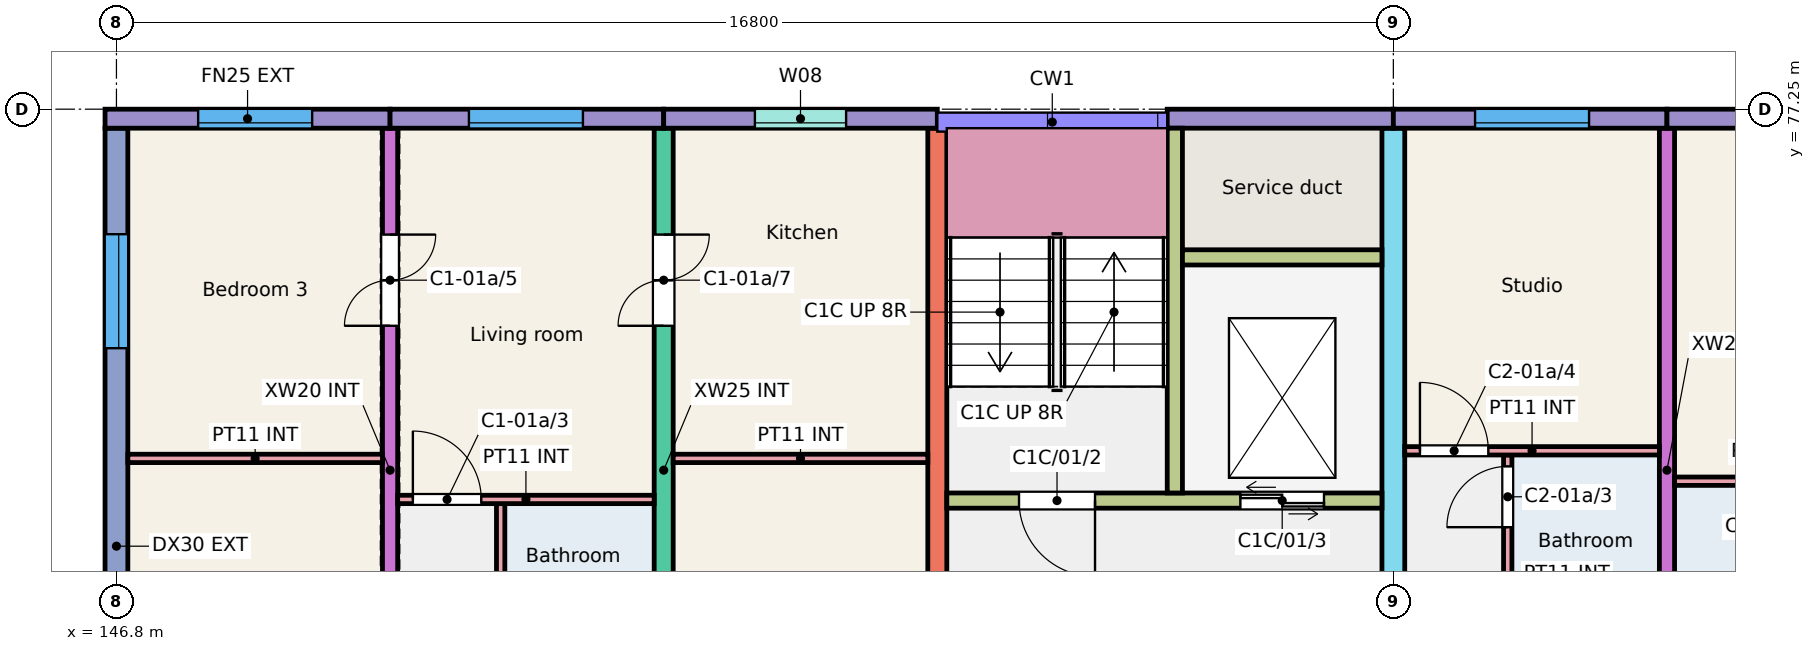
"""IFC4 building model, lengths in metres.
Left out: names, types, materials, properties, quantities, classifications, styles, units other than length and angle.
Written with IfcOpenShell. Run it as: python <this file> out.ifc"""

import sys

from ifc_helpers import new_model, si_unit, direction, frame, frame_2d, origin, place, context, subcontext, project, spatial, rectangle, extrude, element, fill, save


model = new_model("IFC4")
c1 = context("Model", 3, precision=1e-05, world=origin(), true_north=direction((0.0, 1.0)))
c2 = subcontext(c1, "Body", "Model", "MODEL_VIEW")
j1 = project(units=[si_unit("LENGTHUNIT", "METRE"), si_unit("PLANEANGLEUNIT", "RADIAN")], contexts=[c1])
p1 = place(None, origin())
s1 = spatial("IfcSite", under=j1, at=p1, CompositionType="ELEMENT")
p2 = place(p1, origin())
s2 = spatial("IfcBuilding", under=s1, at=p2, CompositionType="ELEMENT")
p3 = place(p2, frame((0.0, 0.0, 3.0)))
s3 = spatial("IfcBuildingStorey", under=s2, at=p3, CompositionType="ELEMENT", Elevation=3.0)
p4 = place(p3, frame((146.8, 66.0, 0.0), z_axis=(0.0, 0.0, 1.0), x_axis=(0.0, 1.0, 0.0)))
e1 = element("IfcWall", 1, at=p4, inside=s3, PredefinedType="SHEAR", context=c2, shape_type="SweptSolid", body=[
    extrude(rectangle(XDim=11.0, YDim=0.3, at=frame_2d((5.5, 0.0))), origin(), (0.0, 0.0, 1.0), 3.0),
])
p5 = place(p4, frame((3.55, 0.0, 0.9)))
e2 = element("IfcOpeningElement", 2, at=p5, cuts=e1, PredefinedType="OPENING", context=c2, shape_type="SweptSolid", body=[
    extrude(rectangle(XDim=1.5, YDim=1.5, at=frame_2d((0.75, 0.75))), frame((0.0, 0.16, 0.0), z_axis=(0.0, -1.0, 0.0), x_axis=(1.0, 0.0, 0.0)), (0.0, 0.0, 1.0), 0.32),
])
p6 = place(p4, frame((8.105, 0.0, 0.9)))
e3 = element("IfcOpeningElement", 3, at=p6, cuts=e1, PredefinedType="OPENING", context=c2, shape_type="SweptSolid", body=[
    extrude(rectangle(XDim=1.5, YDim=1.5, at=frame_2d((0.75, 0.75))), frame((0.0, 0.16, 0.0), z_axis=(0.0, -1.0, 0.0), x_axis=(1.0, 0.0, 0.0)), (0.0, 0.0, 1.0), 0.32),
])
p7 = place(p3, frame((150.4, 68.0, 0.0), z_axis=(0.0, 0.0, 1.0), x_axis=(0.0, 1.0, 0.0)))
e4 = element("IfcWall", 4, at=p7, inside=s3, PredefinedType="SHEAR", context=c2, shape_type="SweptSolid", body=[
    extrude(rectangle(XDim=9.0, YDim=0.2, at=frame_2d((4.5, 0.0))), origin(), (0.0, 0.0, 1.0), 3.0),
])
p8 = place(p7, frame((0.175, 0.0, 0.0)))
e5 = element("IfcOpeningElement", 5, at=p8, cuts=e4, PredefinedType="OPENING", context=c2, shape_type="SweptSolid", body=[
    extrude(rectangle(XDim=1.2, YDim=2.1, at=frame_2d((0.6, 1.05))), frame((0.0, 0.11, 0.0), z_axis=(0.0, -1.0, 0.0), x_axis=(1.0, 0.0, 0.0)), (0.0, 0.0, 1.0), 0.22),
])
p9 = place(p7, frame((6.4, 0.0, 0.0)))
e6 = element("IfcOpeningElement", 6, at=p9, cuts=e4, PredefinedType="OPENING", context=c2, shape_type="SweptSolid", body=[
    extrude(rectangle(XDim=1.2, YDim=2.1, at=frame_2d((0.6, 1.05))), frame((0.0, 0.11, 0.0), z_axis=(0.0, -1.0, 0.0), x_axis=(1.0, 0.0, 0.0)), (0.0, 0.0, 1.0), 0.22),
])
p10 = place(p3, frame((154.0, 68.0, 0.0), z_axis=(0.0, 0.0, 1.0), x_axis=(0.0, 1.0, 0.0)))
e7 = element("IfcWall", 7, at=p10, inside=s3, PredefinedType="SHEAR", context=c2, shape_type="SweptSolid", body=[
    extrude(rectangle(XDim=9.0, YDim=0.25, at=frame_2d((4.5, 0.0))), origin(), (0.0, 0.0, 1.0), 3.0),
])
p11 = place(p10, frame((0.175, 0.0, 0.0)))
e8 = element("IfcOpeningElement", 8, at=p11, cuts=e7, PredefinedType="OPENING", context=c2, shape_type="SweptSolid", body=[
    extrude(rectangle(XDim=1.2, YDim=2.1, at=frame_2d((0.6, 1.05))), frame((0.0, 0.135, 0.0), z_axis=(0.0, -1.0, 0.0), x_axis=(1.0, 0.0, 0.0)), (0.0, 0.0, 1.0), 0.27),
])
p12 = place(p10, frame((6.4, 0.0, 0.0)))
e9 = element("IfcOpeningElement", 9, at=p12, cuts=e7, PredefinedType="OPENING", context=c2, shape_type="SweptSolid", body=[
    extrude(rectangle(XDim=1.2, YDim=2.1, at=frame_2d((0.6, 1.05))), frame((0.0, 0.135, 0.0), z_axis=(0.0, -1.0, 0.0), x_axis=(1.0, 0.0, 0.0)), (0.0, 0.0, 1.0), 0.27),
])
p13 = place(p3, frame((157.6, 68.0, 0.0), z_axis=(0.0, 0.0, 1.0), x_axis=(0.0, 1.0, 0.0)))
e10 = element("IfcWall", 10, at=p13, inside=s3, PredefinedType="SHEAR", context=c2, shape_type="SweptSolid", body=[
    extrude(rectangle(XDim=9.0, YDim=0.25, at=frame_2d((4.5, 0.0))), origin(), (0.0, 0.0, 1.0), 3.0),
])
p14 = place(p3, frame((163.6, 66.0, 0.0), z_axis=(0.0, 0.0, 1.0), x_axis=(0.0, 1.0, 0.0)))
e11 = element("IfcWall", 11, at=p14, inside=s3, PredefinedType="SHEAR", context=c2, shape_type="SweptSolid", body=[
    extrude(rectangle(XDim=11.0, YDim=0.3, at=frame_2d((5.5, 0.0))), origin(), (0.0, 0.0, 1.0), 3.0),
])
p15 = place(p14, frame((0.3, 0.0, 0.0)))
e12 = element("IfcOpeningElement", 12, at=p15, cuts=e11, PredefinedType="OPENING", context=c2, shape_type="SweptSolid", body=[
    extrude(rectangle(XDim=1.2, YDim=2.1, at=frame_2d((0.6, 1.05))), frame((0.0, 0.16, 0.0), z_axis=(0.0, -1.0, 0.0), x_axis=(1.0, 0.0, 0.0)), (0.0, 0.0, 1.0), 0.32),
])
p16 = place(p3, frame((167.2, 68.0, 0.0), z_axis=(0.0, 0.0, 1.0), x_axis=(0.0, 1.0, 0.0)))
e13 = element("IfcWall", 13, at=p16, inside=s3, PredefinedType="SHEAR", context=c2, shape_type="SweptSolid", body=[
    extrude(rectangle(XDim=9.0, YDim=0.2, at=frame_2d((4.5, 0.0))), origin(), (0.0, 0.0, 1.0), 3.0),
])
p17 = place(p3, frame((146.65, 77.125, 0.0), z_axis=(0.0, 0.0, 1.0), x_axis=(1.0, 0.0, 0.0)))
e14 = element("IfcWall", 14, at=p17, inside=s3, PredefinedType="SOLIDWALL", context=c2, shape_type="SweptSolid", body=[
    extrude(rectangle(XDim=3.75, YDim=0.25, at=frame_2d((1.875, 0.0))), origin(), (0.0, 0.0, 1.0), 3.0),
])
p18 = place(p17, frame((1.225, 0.0, 0.9)))
e15 = element("IfcOpeningElement", 15, at=p18, cuts=e14, PredefinedType="OPENING", context=c2, shape_type="SweptSolid", body=[
    extrude(rectangle(XDim=1.5, YDim=1.5, at=frame_2d((0.75, 0.75))), frame((0.0, 0.135, 0.0), z_axis=(0.0, -1.0, 0.0), x_axis=(1.0, 0.0, 0.0)), (0.0, 0.0, 1.0), 0.27),
])
p19 = place(p3, frame((150.4, 77.125, 0.0), z_axis=(0.0, 0.0, 1.0), x_axis=(1.0, 0.0, 0.0)))
e16 = element("IfcWall", 16, at=p19, inside=s3, PredefinedType="SOLIDWALL", context=c2, shape_type="SweptSolid", body=[
    extrude(rectangle(XDim=3.6, YDim=0.25, at=frame_2d((1.8, 0.0))), origin(), (0.0, 0.0, 1.0), 3.0),
])
p20 = place(p19, frame((1.038, 0.0, 0.9)))
e17 = element("IfcOpeningElement", 17, at=p20, cuts=e16, PredefinedType="OPENING", context=c2, shape_type="SweptSolid", body=[
    extrude(rectangle(XDim=1.5, YDim=1.5, at=frame_2d((0.75, 0.75))), frame((0.0, 0.135, 0.0), z_axis=(0.0, -1.0, 0.0), x_axis=(1.0, 0.0, 0.0)), (0.0, 0.0, 1.0), 0.27),
])
p21 = place(p3, frame((154.0, 77.125, 0.0), z_axis=(0.0, 0.0, 1.0), x_axis=(1.0, 0.0, 0.0)))
e18 = element("IfcWall", 18, at=p21, inside=s3, PredefinedType="SOLIDWALL", context=c2, shape_type="SweptSolid", body=[
    extrude(rectangle(XDim=3.6, YDim=0.25, at=frame_2d((1.8, 0.0))), origin(), (0.0, 0.0, 1.0), 3.0),
])
p22 = place(p21, frame((1.2, 0.0, 1.1)))
e19 = element("IfcOpeningElement", 19, at=p22, cuts=e18, PredefinedType="OPENING", context=c2, shape_type="SweptSolid", body=[
    extrude(rectangle(XDim=1.2, YDim=1.3, at=frame_2d((0.6, 0.65))), frame((0.0, 0.135, 0.0), z_axis=(0.0, -1.0, 0.0), x_axis=(1.0, 0.0, 0.0)), (0.0, 0.0, 1.0), 0.27),
])
p23 = place(p3, frame((160.625, 77.125, 0.0), z_axis=(0.0, 0.0, 1.0), x_axis=(1.0, 0.0, 0.0)))
e20 = element("IfcWall", 20, at=p23, inside=s3, PredefinedType="SOLIDWALL", context=c2, shape_type="SweptSolid", body=[
    extrude(rectangle(XDim=2.975, YDim=0.25, at=frame_2d((1.488, 0.0))), origin(), (0.0, 0.0, 1.0), 3.0),
])
p24 = place(p3, frame((157.725, 72.1, 0.0), z_axis=(0.0, 0.0, 1.0), x_axis=(1.0, 0.0, 0.0)))
e21 = element("IfcWall", 21, at=p24, inside=s3, PredefinedType="SHEAR", context=c2, shape_type="SweptSolid", body=[
    extrude(rectangle(XDim=5.725, YDim=0.2, at=frame_2d((2.862, 0.0))), origin(), (0.0, 0.0, 1.0), 3.0),
])
p25 = place(p24, frame((0.95, 0.0, 0.0)))
e22 = element("IfcOpeningElement", 22, at=p25, cuts=e21, PredefinedType="OPENING", context=c2, shape_type="SweptSolid", body=[
    extrude(rectangle(XDim=1.0, YDim=2.1, at=frame_2d((0.5, 1.05))), frame((0.0, 0.11, 0.0), z_axis=(0.0, -1.0, 0.0), x_axis=(1.0, 0.0, 0.0)), (0.0, 0.0, 1.0), 0.22),
])
p26 = place(p24, frame((3.863, 0.0, 0.0)))
e23 = element("IfcOpeningElement", 23, at=p26, cuts=e21, PredefinedType="OPENING", context=c2, shape_type="SweptSolid", body=[
    extrude(rectangle(XDim=1.1, YDim=2.1, at=frame_2d((0.55, 1.05))), frame((0.0, 0.11, 0.0), z_axis=(0.0, -1.0, 0.0), x_axis=(1.0, 0.0, 0.0)), (0.0, 0.0, 1.0), 0.22),
])
p27 = place(p3, frame((160.725, 72.2, 0.0), z_axis=(0.0, 0.0, 1.0), x_axis=(0.0, 1.0, 0.0)))
e24 = element("IfcWall", 24, at=p27, inside=s3, PredefinedType="SHEAR", context=c2, shape_type="SweptSolid", body=[
    extrude(rectangle(XDim=4.8, YDim=0.2, at=frame_2d((2.4, 0.0))), origin(), (0.0, 0.0, 1.0), 3.0),
])
p28 = place(p3, frame((160.825, 75.3, 0.0), z_axis=(0.0, 0.0, 1.0), x_axis=(1.0, 0.0, 0.0)))
e25 = element("IfcWall", 25, at=p28, inside=s3, PredefinedType="SHEAR", context=c2, shape_type="SweptSolid", body=[
    extrude(rectangle(XDim=2.625, YDim=0.2, at=frame_2d((1.312, 0.0))), origin(), (0.0, 0.0, 1.0), 3.0),
])
p29 = place(p3, frame((163.6, 77.125, 0.0), z_axis=(0.0, 0.0, 1.0), x_axis=(1.0, 0.0, 0.0)))
e26 = element("IfcWall", 26, at=p29, inside=s3, PredefinedType="SOLIDWALL", context=c2, shape_type="SweptSolid", body=[
    extrude(rectangle(XDim=3.6, YDim=0.25, at=frame_2d((1.8, 0.0))), origin(), (0.0, 0.0, 1.0), 3.0),
])
p30 = place(p29, frame((1.075, 0.0, 0.9)))
e27 = element("IfcOpeningElement", 27, at=p30, cuts=e26, PredefinedType="OPENING", context=c2, shape_type="SweptSolid", body=[
    extrude(rectangle(XDim=1.5, YDim=1.5, at=frame_2d((0.75, 0.75))), frame((0.0, 0.135, 0.0), z_axis=(0.0, -1.0, 0.0), x_axis=(1.0, 0.0, 0.0)), (0.0, 0.0, 1.0), 0.27),
])
p31 = place(p3, frame((167.2, 77.125, 0.0), z_axis=(0.0, 0.0, 1.0), x_axis=(1.0, 0.0, 0.0)))
e28 = element("IfcWall", 28, at=p31, inside=s3, PredefinedType="SOLIDWALL", context=c2, shape_type="SweptSolid", body=[
    extrude(rectangle(XDim=3.6, YDim=0.25, at=frame_2d((1.8, 0.0))), origin(), (0.0, 0.0, 1.0), 3.0),
])
p32 = place(p31, frame((1.05, 0.0, 0.9)))
e29 = element("IfcOpeningElement", 29, at=p32, cuts=e28, PredefinedType="OPENING", context=c2, shape_type="SweptSolid", body=[
    extrude(rectangle(XDim=1.5, YDim=1.5, at=frame_2d((0.75, 0.75))), frame((0.0, 0.135, 0.0), z_axis=(0.0, -1.0, 0.0), x_axis=(1.0, 0.0, 0.0)), (0.0, 0.0, 1.0), 0.27),
])
p33 = place(p3, frame((151.855, 69.66, 0.0), z_axis=(0.0, 0.0, 1.0), x_axis=(0.0, 1.0, 0.0)))
e30 = element("IfcWall", 30, at=p33, inside=s3, PredefinedType="PARTITIONING", context=c2, shape_type="SweptSolid", body=[
    extrude(rectangle(XDim=2.4, YDim=0.11, at=frame_2d((1.2, 0.0))), origin(), (0.0, 0.0, 1.0), 2.8),
])
p34 = place(p3, frame((150.5, 72.115, 0.0), z_axis=(0.0, 0.0, 1.0), x_axis=(1.0, 0.0, 0.0)))
e31 = element("IfcWall", 31, at=p34, inside=s3, PredefinedType="PARTITIONING", context=c2, shape_type="SweptSolid", body=[
    extrude(rectangle(XDim=3.375, YDim=0.11, at=frame_2d((1.688, 0.0))), origin(), (0.0, 0.0, 1.0), 2.8),
])
p35 = place(p34, frame((0.2, 0.0, 0.0)))
e32 = element("IfcOpeningElement", 32, at=p35, cuts=e31, PredefinedType="OPENING", context=c2, shape_type="SweptSolid", body=[
    extrude(rectangle(XDim=0.9, YDim=2.1, at=frame_2d((0.45, 1.05))), frame((0.0, 0.065, 0.0), z_axis=(0.0, -1.0, 0.0), x_axis=(1.0, 0.0, 0.0)), (0.0, 0.0, 1.0), 0.13),
])
for number, where, z_axis, x_axis in (
    (33, (146.95, 72.655, 0.0), (0.0, 0.0, 1.0), (1.0, 0.0, 0.0)),
    (34, (154.125, 72.655, 0.0), (0.0, 0.0, 1.0), (1.0, 0.0, 0.0)),
):
    element("IfcWall", number, at=place(p3, frame(where, z_axis=z_axis, x_axis=x_axis)), inside=s3, PredefinedType="PARTITIONING", context=c2, shape_type="SweptSolid", body=[
        extrude(rectangle(XDim=3.35, YDim=0.11, at=frame_2d((1.675, 0.0))), origin(), (0.0, 0.0, 1.0), 2.8),
    ])
p36 = place(p3, frame((165.105, 68.0, 0.0), z_axis=(0.0, 0.0, 1.0), x_axis=(0.0, 1.0, 0.0)))
e35 = element("IfcWall", 35, at=p36, inside=s3, PredefinedType="PARTITIONING", context=c2, shape_type="SweptSolid", body=[
    extrude(rectangle(XDim=4.7, YDim=0.11, at=frame_2d((2.35, 0.0))), origin(), (0.0, 0.0, 1.0), 2.8),
])
p37 = place(p36, frame((0.2, 0.0, 0.0)))
e36 = element("IfcOpeningElement", 36, at=p37, cuts=e35, PredefinedType="OPENING", context=c2, shape_type="SweptSolid", body=[
    extrude(rectangle(XDim=0.8, YDim=2.1, at=frame_2d((0.4, 1.05))), frame((0.0, 0.065, 0.0), z_axis=(0.0, -1.0, 0.0), x_axis=(1.0, 0.0, 0.0)), (0.0, 0.0, 1.0), 0.13),
])
p38 = place(p36, frame((3.75, 0.0, 0.0)))
e37 = element("IfcOpeningElement", 37, at=p38, cuts=e35, PredefinedType="OPENING", context=c2, shape_type="SweptSolid", body=[
    extrude(rectangle(XDim=0.8, YDim=2.1, at=frame_2d((0.4, 1.05))), frame((0.0, 0.065, 0.0), z_axis=(0.0, -1.0, 0.0), x_axis=(1.0, 0.0, 0.0)), (0.0, 0.0, 1.0), 0.13),
])
p39 = place(p3, frame((163.75, 72.755, 0.0), z_axis=(0.0, 0.0, 1.0), x_axis=(1.0, 0.0, 0.0)))
e38 = element("IfcWall", 38, at=p39, inside=s3, PredefinedType="PARTITIONING", context=c2, shape_type="SweptSolid", body=[
    extrude(rectangle(XDim=3.35, YDim=0.11, at=frame_2d((1.675, 0.0))), origin(), (0.0, 0.0, 1.0), 2.8),
])
p40 = place(p39, frame((0.2, 0.0, 0.0)))
e39 = element("IfcOpeningElement", 39, at=p40, cuts=e38, PredefinedType="OPENING", context=c2, shape_type="SweptSolid", body=[
    extrude(rectangle(XDim=0.9, YDim=2.1, at=frame_2d((0.45, 1.05))), frame((0.0, 0.065, 0.0), z_axis=(0.0, -1.0, 0.0), x_axis=(1.0, 0.0, 0.0)), (0.0, 0.0, 1.0), 0.13),
])
p41 = place(p3, frame((167.3, 72.355, 0.0), z_axis=(0.0, 0.0, 1.0), x_axis=(1.0, 0.0, 0.0)))
e40 = element("IfcWall", 40, at=p41, inside=s3, PredefinedType="PARTITIONING", context=c2, shape_type="SweptSolid", body=[
    extrude(rectangle(XDim=3.4, YDim=0.11, at=frame_2d((1.7, 0.0))), origin(), (0.0, 0.0, 1.0), 2.8),
])
p42 = place(p41, frame((2.3, 0.0, 0.0)))
e41 = element("IfcOpeningElement", 41, at=p42, cuts=e40, PredefinedType="OPENING", context=c2, shape_type="SweptSolid", body=[
    extrude(rectangle(XDim=0.9, YDim=2.1, at=frame_2d((0.45, 1.05))), frame((0.0, 0.065, 0.0), z_axis=(0.0, -1.0, 0.0), x_axis=(1.0, 0.0, 0.0)), (0.0, 0.0, 1.0), 0.13),
])
p43 = place(p18, origin())
e42 = element("IfcWindow", 42, at=p43, inside=s3, PartitioningType="SINGLE_PANEL", PredefinedType="WINDOW", context=c2, shape_type="SweptSolid", body=[
    extrude(rectangle(XDim=1.5, YDim=1.5, at=frame_2d((0.75, 0.75))), frame((0.0, -0.025, 0.0), z_axis=(0.0, -1.0, 0.0), x_axis=(1.0, 0.0, 0.0)), (0.0, 0.0, 1.0), 0.06),
])
fill(e15, e42)
p44 = place(p22, origin())
e43 = element("IfcWindow", 43, at=p44, inside=s3, PartitioningType="SINGLE_PANEL", PredefinedType="WINDOW", context=c2, shape_type="SweptSolid", body=[
    extrude(rectangle(XDim=1.2, YDim=1.3, at=frame_2d((0.6, 0.65))), frame((0.0, -0.025, 0.0), z_axis=(0.0, -1.0, 0.0), x_axis=(1.0, 0.0, 0.0)), (0.0, 0.0, 1.0), 0.06),
])
fill(e19, e43)
p45 = place(p20, origin())
e44 = element("IfcWindow", 44, at=p45, inside=s3, PartitioningType="SINGLE_PANEL", PredefinedType="WINDOW", context=c2, shape_type="SweptSolid", body=[
    extrude(rectangle(XDim=1.5, YDim=1.5, at=frame_2d((0.75, 0.75))), frame((0.0, -0.025, 0.0), z_axis=(0.0, -1.0, 0.0), x_axis=(1.0, 0.0, 0.0)), (0.0, 0.0, 1.0), 0.06),
])
fill(e17, e44)
p46 = place(p6, origin())
e45 = element("IfcWindow", 45, at=p46, inside=s3, PartitioningType="SINGLE_PANEL", PredefinedType="WINDOW", context=c2, shape_type="SweptSolid", body=[
    extrude(rectangle(XDim=1.5, YDim=1.5, at=frame_2d((0.75, 0.75))), frame((0.0, 0.0, 0.0), z_axis=(0.0, -1.0, 0.0), x_axis=(1.0, 0.0, 0.0)), (0.0, 0.0, 1.0), 0.06),
])
fill(e3, e45)
p47 = place(p30, origin())
e46 = element("IfcWindow", 46, at=p47, inside=s3, PartitioningType="SINGLE_PANEL", PredefinedType="WINDOW", context=c2, shape_type="SweptSolid", body=[
    extrude(rectangle(XDim=1.5, YDim=1.5, at=frame_2d((0.75, 0.75))), frame((0.0, -0.025, 0.0), z_axis=(0.0, -1.0, 0.0), x_axis=(1.0, 0.0, 0.0)), (0.0, 0.0, 1.0), 0.06),
])
fill(e27, e46)
p48 = place(p35, origin())
e47 = element("IfcDoor", 47, at=p48, inside=s3, OperationType="SINGLE_SWING_LEFT", PredefinedType="DOOR", context=c2, shape_type="SweptSolid", body=[
    extrude(rectangle(XDim=0.9, YDim=2.1, at=frame_2d((0.45, 1.05))), frame((0.0, 0.025, 0.0), z_axis=(0.0, -1.0, 0.0), x_axis=(1.0, 0.0, 0.0)), (0.0, 0.0, 1.0), 0.05),
])
fill(e32, e47)
p49 = place(p9, origin())
e48 = element("IfcDoor", 48, at=p49, inside=s3, OperationType="DOUBLE_DOOR_SINGLE_SWING", PredefinedType="DOOR", context=c2, shape_type="SweptSolid", body=[
    extrude(rectangle(XDim=1.2, YDim=2.1, at=frame_2d((0.6, 1.05))), frame((0.0, 0.025, 0.0), z_axis=(0.0, -1.0, 0.0), x_axis=(1.0, 0.0, 0.0)), (0.0, 0.0, 1.0), 0.05),
])
fill(e6, e48)
p50 = place(p12, origin())
e49 = element("IfcDoor", 49, at=p50, inside=s3, OperationType="DOUBLE_DOOR_SINGLE_SWING", PredefinedType="DOOR", context=c2, shape_type="SweptSolid", body=[
    extrude(rectangle(XDim=1.2, YDim=2.1, at=frame_2d((0.6, 1.05))), frame((0.0, 0.025, 0.0), z_axis=(0.0, -1.0, 0.0), x_axis=(1.0, 0.0, 0.0)), (0.0, 0.0, 1.0), 0.05),
])
fill(e9, e49)
p51 = place(p38, origin())
e50 = element("IfcDoor", 50, at=p51, inside=s3, OperationType="SINGLE_SWING_LEFT", PredefinedType="DOOR", context=c2, shape_type="SweptSolid", body=[
    extrude(rectangle(XDim=0.8, YDim=2.1, at=frame_2d((0.4, 1.05))), frame((0.0, 0.025, 0.0), z_axis=(0.0, -1.0, 0.0), x_axis=(1.0, 0.0, 0.0)), (0.0, 0.0, 1.0), 0.05),
])
fill(e37, e50)
p52 = place(p40, origin())
e51 = element("IfcDoor", 51, at=p52, inside=s3, OperationType="SINGLE_SWING_LEFT", PredefinedType="DOOR", context=c2, shape_type="SweptSolid", body=[
    extrude(rectangle(XDim=0.9, YDim=2.1, at=frame_2d((0.45, 1.05))), frame((0.0, 0.025, 0.0), z_axis=(0.0, -1.0, 0.0), x_axis=(1.0, 0.0, 0.0)), (0.0, 0.0, 1.0), 0.05),
])
fill(e39, e51)
p53 = place(p25, origin())
e52 = element("IfcDoor", 52, at=p53, inside=s3, OperationType="SINGLE_SWING_RIGHT", PredefinedType="DOOR", context=c2, shape_type="SweptSolid", body=[
    extrude(rectangle(XDim=1.0, YDim=2.1, at=frame_2d((0.5, 1.05))), frame((0.0, 0.025, 0.0), z_axis=(0.0, -1.0, 0.0), x_axis=(1.0, 0.0, 0.0)), (0.0, 0.0, 1.0), 0.05),
])
fill(e22, e52)
p54 = place(p26, origin())
e53 = element("IfcDoor", 53, at=p54, inside=s3, OperationType="DOUBLE_DOOR_SLIDING", PredefinedType="DOOR", context=c2, shape_type="SweptSolid", body=[
    extrude(rectangle(XDim=1.1, YDim=2.1, at=frame_2d((0.55, 1.05))), frame((0.0, 0.025, 0.0), z_axis=(0.0, -1.0, 0.0), x_axis=(1.0, 0.0, 0.0)), (0.0, 0.0, 1.0), 0.05),
])
fill(e23, e53)
save(model, sys.argv[1])
